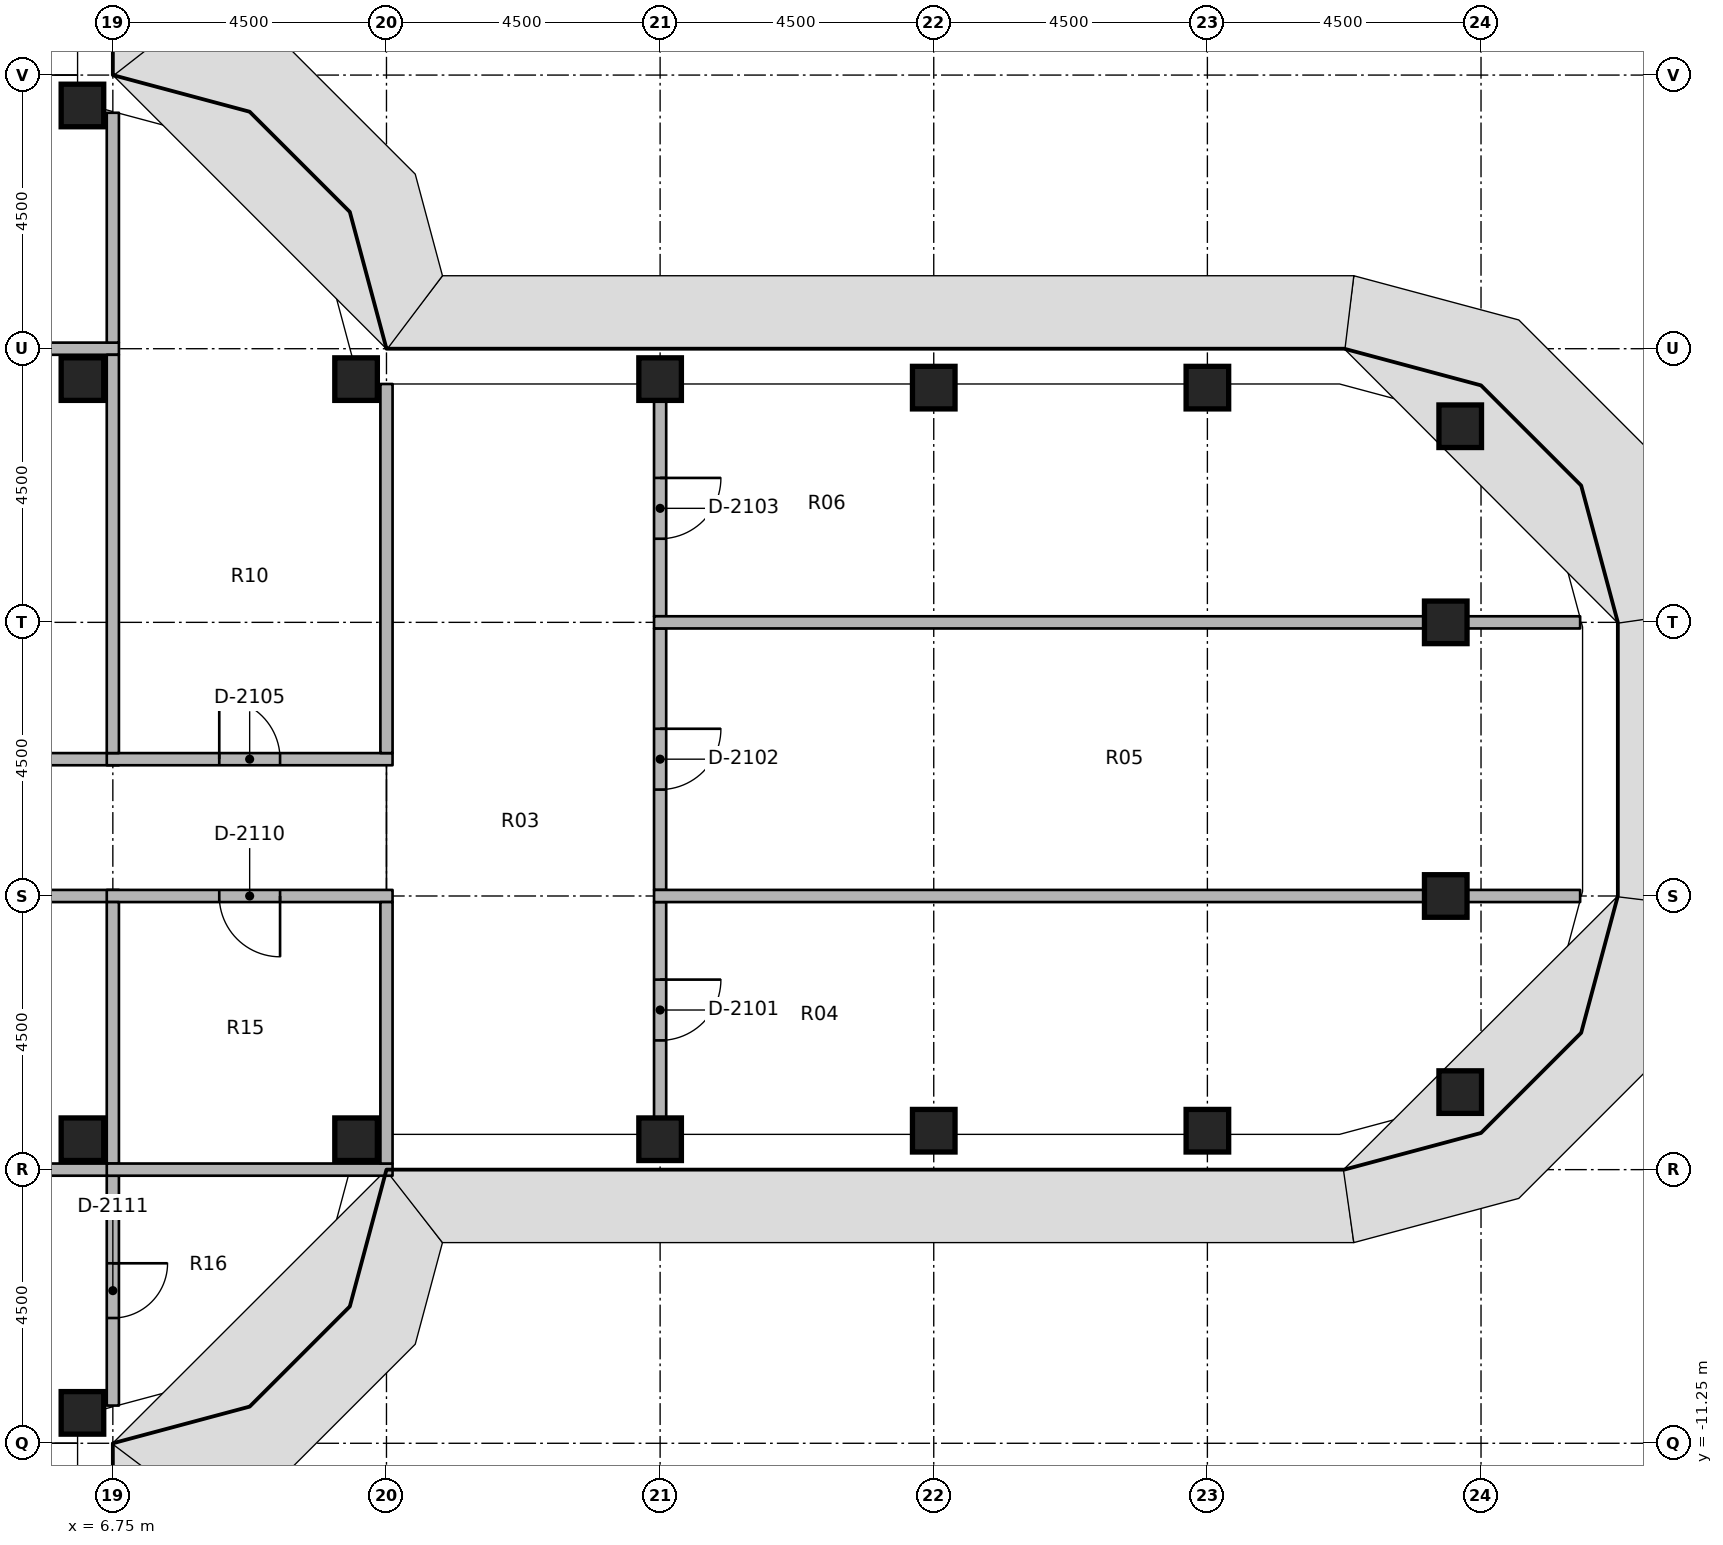
"""IFC4 building model, lengths in metres.
Left out: names, types, materials, properties, quantities, classifications, styles, units other than length and angle.
Written with IfcOpenShell. Run it as: python <this file> out.ifc"""

import sys

from ifc_helpers import new_model, si_unit, direction, frame, frame_2d, origin, origin_2d, place, context, subcontext, project, spatial, rectangle, extrude, element, fill, save


model = new_model("IFC4")
c1 = context("Model", 3, precision=1e-05, world=origin(), true_north=direction((0.0, 1.0)))
c2 = subcontext(c1, "Body", "Model", "MODEL_VIEW")
j1 = project(units=[si_unit("LENGTHUNIT", "METRE"), si_unit("PLANEANGLEUNIT", "RADIAN")], contexts=[c1])
p1 = place(None, origin())
s1 = spatial("IfcSite", under=j1, at=p1, CompositionType="ELEMENT")
p2 = place(p1, origin())
s2 = spatial("IfcBuilding", under=s1, at=p2, CompositionType="ELEMENT")
p3 = place(p2, frame((0.0, 0.0, 195.4)))
s3 = spatial("IfcBuildingStorey", under=s2, at=p3, CompositionType="ELEMENT", Elevation=195.4)
for number, where, z_axis, x_axis in (
    (1, (6.25, -10.75, 0.0), (0.0, 0.0, 1.0), (1.0, 0.0, 0.0)),
    (2, (6.25, -6.25, 0.0), (0.0, 0.0, 1.0), (1.0, 0.0, 0.0)),
    (3, (6.25, 6.25, 0.0), (0.0, 0.0, 1.0), (1.0, 0.0, 0.0)),
    (4, (6.25, 10.75, 0.0), (0.0, 0.0, 1.0), (1.0, 0.0, 0.0)),
    (5, (10.75, -6.25, 0.0), (0.0, 0.0, 1.0), (1.0, 0.0, 0.0)),
    (6, (10.75, 6.25, 0.0), (0.0, 0.0, 1.0), (1.0, 0.0, 0.0)),
    (7, (15.75, -6.25, 0.0), (0.0, 0.0, 1.0), (1.0, 0.0, 0.0)),
    (8, (15.75, 6.25, 0.0), (0.0, 0.0, 1.0), (1.0, 0.0, 0.0)),
    (9, (20.25, -6.11, 0.0), (0.0, 0.0, 1.0), (1.0, 0.0, 0.0)),
    (10, (20.25, 6.11, 0.0), (0.0, 0.0, 1.0), (1.0, 0.0, 0.0)),
    (11, (24.75, -6.11, 0.0), (0.0, 0.0, 1.0), (1.0, 0.0, 0.0)),
    (12, (24.75, 6.11, 0.0), (0.0, 0.0, 1.0), (1.0, 0.0, 0.0)),
    (13, (28.908, -5.475, 0.0), (0.0, 0.0, 1.0), (1.0, 0.0, 0.0)),
    (14, (28.67, -2.25, 0.0), (0.0, 0.0, 1.0), (1.0, 0.0, 0.0)),
    (15, (28.67, 2.25, 0.0), (0.0, 0.0, 1.0), (1.0, 0.0, 0.0)),
    (16, (28.908, 5.475, 0.0), (0.0, 0.0, 1.0), (1.0, 0.0, 0.0)),
):
    element("IfcColumn", number, at=place(p3, frame(where, z_axis=z_axis, x_axis=x_axis)), inside=s3, PredefinedType="COLUMN", context=c2, shape_type="SweptSolid", body=[
        extrude(rectangle(XDim=0.7, YDim=0.7, at=origin_2d()), origin(), (0.0, 0.0, 1.0), 3.65),
    ])
p4 = place(p3, frame((1.025, 0.0, 0.0), z_axis=(0.0, 0.0, 1.0), x_axis=(1.0, 0.0, 0.0)))
e17 = element("IfcWall", 17, at=p4, inside=s3, PredefinedType="PARTITIONING", context=c2, shape_type="SweptSolid", body=[
    extrude(rectangle(XDim=5.825, YDim=0.2, at=frame_2d((2.913, 0.0))), origin(), (0.0, 0.0, 1.0), 2.75),
])
p5 = place(p4, frame((2.413, 0.0, 0.0)))
e18 = element("IfcOpeningElement", 18, at=p5, cuts=e17, PredefinedType="OPENING", context=c2, shape_type="SweptSolid", body=[
    extrude(rectangle(XDim=1.0, YDim=2.1, at=frame_2d((0.5, 1.05))), frame((0.0, 0.11, 0.0), z_axis=(0.0, -1.0, 0.0), x_axis=(1.0, 0.0, 0.0)), (0.0, 0.0, 1.0), 0.22),
])
p6 = place(p3, frame((6.65, 0.0, 0.0), z_axis=(0.0, 0.0, 1.0), x_axis=(1.0, 0.0, 0.0)))
e19 = element("IfcWall", 19, at=p6, inside=s3, PredefinedType="PARTITIONING", context=c2, shape_type="SweptSolid", body=[
    extrude(rectangle(XDim=4.7, YDim=0.2, at=frame_2d((2.35, 0.0))), origin(), (0.0, 0.0, 1.0), 2.75),
])
p7 = place(p6, frame((1.85, 0.0, 0.0)))
e20 = element("IfcOpeningElement", 20, at=p7, cuts=e19, PredefinedType="OPENING", context=c2, shape_type="SweptSolid", body=[
    extrude(rectangle(XDim=1.0, YDim=2.1, at=frame_2d((0.5, 1.05))), frame((0.0, 0.11, 0.0), z_axis=(0.0, -1.0, 0.0), x_axis=(1.0, 0.0, 0.0)), (0.0, 0.0, 1.0), 0.22),
])
p8 = place(p3, frame((6.85, -2.25, 0.0), z_axis=(0.0, 0.0, 1.0), x_axis=(-1.0, 0.0, 0.0)))
e21 = element("IfcWall", 21, at=p8, inside=s3, PredefinedType="PARTITIONING", context=c2, shape_type="SweptSolid", body=[
    extrude(rectangle(XDim=5.825, YDim=0.2, at=frame_2d((2.913, 0.0))), origin(), (0.0, 0.0, 1.0), 2.75),
])
p9 = place(p8, frame((2.413, 0.0, 0.0)))
e22 = element("IfcOpeningElement", 22, at=p9, cuts=e21, PredefinedType="OPENING", context=c2, shape_type="SweptSolid", body=[
    extrude(rectangle(XDim=1.0, YDim=2.1, at=frame_2d((0.5, 1.05))), frame((0.0, 0.11, 0.0), z_axis=(0.0, -1.0, 0.0), x_axis=(1.0, 0.0, 0.0)), (0.0, 0.0, 1.0), 0.22),
])
p10 = place(p3, frame((11.35, -2.25, 0.0), z_axis=(0.0, 0.0, 1.0), x_axis=(-1.0, 0.0, 0.0)))
e23 = element("IfcWall", 23, at=p10, inside=s3, PredefinedType="PARTITIONING", context=c2, shape_type="SweptSolid", body=[
    extrude(rectangle(XDim=4.7, YDim=0.2, at=frame_2d((2.35, 0.0))), origin(), (0.0, 0.0, 1.0), 2.75),
])
p11 = place(p10, frame((1.85, 0.0, 0.0)))
e24 = element("IfcOpeningElement", 24, at=p11, cuts=e23, PredefinedType="OPENING", context=c2, shape_type="SweptSolid", body=[
    extrude(rectangle(XDim=1.0, YDim=2.1, at=frame_2d((0.5, 1.05))), frame((0.0, 0.11, 0.0), z_axis=(0.0, -1.0, 0.0), x_axis=(1.0, 0.0, 0.0)), (0.0, 0.0, 1.0), 0.22),
])
p12 = place(p3, frame((1.025, 6.75, 0.0), z_axis=(0.0, 0.0, 1.0), x_axis=(1.0, 0.0, 0.0)))
e25 = element("IfcWall", 25, at=p12, inside=s3, PredefinedType="PARTITIONING", context=c2, shape_type="SweptSolid", body=[
    extrude(rectangle(XDim=5.825, YDim=0.2, at=frame_2d((2.913, 0.0))), origin(), (0.0, 0.0, 1.0), 2.75),
])
p13 = place(p3, frame((6.75, 6.85, 0.0), z_axis=(0.0, 0.0, 1.0), x_axis=(0.0, 1.0, 0.0)))
e26 = element("IfcWall", 26, at=p13, inside=s3, PredefinedType="PARTITIONING", context=c2, shape_type="SweptSolid", body=[
    extrude(rectangle(XDim=3.78, YDim=0.2, at=frame_2d((1.89, 0.0))), origin(), (0.0, 0.0, 1.0), 2.75),
])
p14 = place(p3, frame((1.025, -6.75, 0.0), z_axis=(0.0, 0.0, 1.0), x_axis=(1.0, 0.0, 0.0)))
e27 = element("IfcWall", 27, at=p14, inside=s3, PredefinedType="PARTITIONING", context=c2, shape_type="SweptSolid", body=[
    extrude(rectangle(XDim=5.825, YDim=0.2, at=frame_2d((2.913, 0.0))), origin(), (0.0, 0.0, 1.0), 2.75),
])
p15 = place(p3, frame((6.75, -6.85, 0.0), z_axis=(0.0, 0.0, 1.0), x_axis=(0.0, -1.0, 0.0)))
e28 = element("IfcWall", 28, at=p15, inside=s3, PredefinedType="PARTITIONING", context=c2, shape_type="SweptSolid", body=[
    extrude(rectangle(XDim=3.78, YDim=0.2, at=frame_2d((1.89, 0.0))), origin(), (0.0, 0.0, 1.0), 2.75),
])
p16 = place(p15, frame((1.44, 0.0, 0.0)))
e29 = element("IfcOpeningElement", 29, at=p16, cuts=e28, PredefinedType="OPENING", context=c2, shape_type="SweptSolid", body=[
    extrude(rectangle(XDim=0.9, YDim=2.1, at=frame_2d((0.45, 1.05))), frame((0.0, 0.11, 0.0), z_axis=(0.0, -1.0, 0.0), x_axis=(1.0, 0.0, 0.0)), (0.0, 0.0, 1.0), 0.22),
])
p17 = place(p3, frame((6.75, 0.1, 0.0), z_axis=(0.0, 0.0, 1.0), x_axis=(0.0, 1.0, 0.0)))
e30 = element("IfcWall", 30, at=p17, inside=s3, PredefinedType="PARTITIONING", context=c2, shape_type="SweptSolid", body=[
    extrude(rectangle(XDim=6.55, YDim=0.2, at=frame_2d((3.275, 0.0))), origin(), (0.0, 0.0, 1.0), 2.75),
])
p18 = place(p3, frame((11.25, 0.1, 0.0), z_axis=(0.0, 0.0, 1.0), x_axis=(0.0, 1.0, 0.0)))
e31 = element("IfcWall", 31, at=p18, inside=s3, PredefinedType="PARTITIONING", context=c2, shape_type="SweptSolid", body=[
    extrude(rectangle(XDim=6.07, YDim=0.2, at=frame_2d((3.035, 0.0))), origin(), (0.0, 0.0, 1.0), 2.75),
])
p19 = place(p3, frame((6.75, -6.65, 0.0), z_axis=(0.0, 0.0, 1.0), x_axis=(0.0, 1.0, 0.0)))
e32 = element("IfcWall", 32, at=p19, inside=s3, PredefinedType="PARTITIONING", context=c2, shape_type="SweptSolid", body=[
    extrude(rectangle(XDim=4.3, YDim=0.2, at=frame_2d((2.15, 0.0))), origin(), (0.0, 0.0, 1.0), 2.75),
])
p20 = place(p3, frame((6.65, -6.75, 0.0), z_axis=(0.0, 0.0, 1.0), x_axis=(1.0, 0.0, 0.0)))
e33 = element("IfcWall", 33, at=p20, inside=s3, PredefinedType="PARTITIONING", context=c2, shape_type="SweptSolid", body=[
    extrude(rectangle(XDim=4.7, YDim=0.2, at=frame_2d((2.35, 0.0))), origin(), (0.0, 0.0, 1.0), 2.75),
])
p21 = place(p3, frame((11.25, -6.65, 0.0), z_axis=(0.0, 0.0, 1.0), x_axis=(0.0, 1.0, 0.0)))
e34 = element("IfcWall", 34, at=p21, inside=s3, PredefinedType="PARTITIONING", context=c2, shape_type="SweptSolid", body=[
    extrude(rectangle(XDim=4.3, YDim=0.2, at=frame_2d((2.15, 0.0))), origin(), (0.0, 0.0, 1.0), 2.75),
])
p22 = place(p3, frame((15.75, -2.35, 0.0), z_axis=(0.0, 0.0, 1.0), x_axis=(0.0, -1.0, 0.0)))
e35 = element("IfcWall", 35, at=p22, inside=s3, PredefinedType="PARTITIONING", context=c2, shape_type="SweptSolid", body=[
    extrude(rectangle(XDim=3.55, YDim=0.2, at=frame_2d((1.775, 0.0))), origin(), (0.0, 0.0, 1.0), 2.75),
])
p23 = place(p22, frame((1.275, 0.0, 0.0)))
e36 = element("IfcOpeningElement", 36, at=p23, cuts=e35, PredefinedType="OPENING", context=c2, shape_type="SweptSolid", body=[
    extrude(rectangle(XDim=1.0, YDim=2.1, at=frame_2d((0.5, 1.05))), frame((0.0, 0.11, 0.0), z_axis=(0.0, -1.0, 0.0), x_axis=(1.0, 0.0, 0.0)), (0.0, 0.0, 1.0), 0.22),
])
p24 = place(p3, frame((15.75, 2.15, 0.0), z_axis=(0.0, 0.0, 1.0), x_axis=(0.0, -1.0, 0.0)))
e37 = element("IfcWall", 37, at=p24, inside=s3, PredefinedType="PARTITIONING", context=c2, shape_type="SweptSolid", body=[
    extrude(rectangle(XDim=4.3, YDim=0.2, at=frame_2d((2.15, 0.0))), origin(), (0.0, 0.0, 1.0), 2.75),
])
p25 = place(p24, frame((1.65, 0.0, 0.0)))
e38 = element("IfcOpeningElement", 38, at=p25, cuts=e37, PredefinedType="OPENING", context=c2, shape_type="SweptSolid", body=[
    extrude(rectangle(XDim=1.0, YDim=2.1, at=frame_2d((0.5, 1.05))), frame((0.0, 0.11, 0.0), z_axis=(0.0, -1.0, 0.0), x_axis=(1.0, 0.0, 0.0)), (0.0, 0.0, 1.0), 0.22),
])
p26 = place(p3, frame((15.75, 5.9, 0.0), z_axis=(0.0, 0.0, 1.0), x_axis=(0.0, -1.0, 0.0)))
e39 = element("IfcWall", 39, at=p26, inside=s3, PredefinedType="PARTITIONING", context=c2, shape_type="SweptSolid", body=[
    extrude(rectangle(XDim=3.55, YDim=0.2, at=frame_2d((1.775, 0.0))), origin(), (0.0, 0.0, 1.0), 2.75),
])
p27 = place(p26, frame((1.275, 0.0, 0.0)))
e40 = element("IfcOpeningElement", 40, at=p27, cuts=e39, PredefinedType="OPENING", context=c2, shape_type="SweptSolid", body=[
    extrude(rectangle(XDim=1.0, YDim=2.1, at=frame_2d((0.5, 1.05))), frame((0.0, 0.11, 0.0), z_axis=(0.0, -1.0, 0.0), x_axis=(1.0, 0.0, 0.0)), (0.0, 0.0, 1.0), 0.22),
])
p28 = place(p3, frame((15.65, -2.25, 0.0), z_axis=(0.0, 0.0, 1.0), x_axis=(1.0, 0.0, 0.0)))
e41 = element("IfcWall", 41, at=p28, inside=s3, PredefinedType="PARTITIONING", context=c2, shape_type="SweptSolid", body=[
    extrude(rectangle(XDim=12.67, YDim=0.2, at=frame_2d((6.335, 0.0))), origin(), (0.0, 0.0, 1.0), 2.75),
])
p29 = place(p3, frame((29.02, -2.25, 0.0), z_axis=(0.0, 0.0, 1.0), x_axis=(1.0, 0.0, 0.0)))
e42 = element("IfcWall", 42, at=p29, inside=s3, PredefinedType="PARTITIONING", context=c2, shape_type="SweptSolid", body=[
    extrude(rectangle(XDim=1.86, YDim=0.2, at=frame_2d((0.93, 0.0))), origin(), (0.0, 0.0, 1.0), 2.75),
])
p30 = place(p3, frame((15.65, 2.25, 0.0), z_axis=(0.0, 0.0, 1.0), x_axis=(1.0, 0.0, 0.0)))
e43 = element("IfcWall", 43, at=p30, inside=s3, PredefinedType="PARTITIONING", context=c2, shape_type="SweptSolid", body=[
    extrude(rectangle(XDim=12.67, YDim=0.2, at=frame_2d((6.335, 0.0))), origin(), (0.0, 0.0, 1.0), 2.75),
])
p31 = place(p3, frame((29.02, 2.25, 0.0), z_axis=(0.0, 0.0, 1.0), x_axis=(1.0, 0.0, 0.0)))
e44 = element("IfcWall", 44, at=p31, inside=s3, PredefinedType="PARTITIONING", context=c2, shape_type="SweptSolid", body=[
    extrude(rectangle(XDim=1.86, YDim=0.2, at=frame_2d((0.93, 0.0))), origin(), (0.0, 0.0, 1.0), 2.75),
])
p32 = place(p23, origin())
e45 = element("IfcDoor", 45, at=p32, inside=s3, OperationType="SINGLE_SWING_LEFT", PredefinedType="DOOR", context=c2, shape_type="SweptSolid", body=[
    extrude(rectangle(XDim=1.0, YDim=2.1, at=frame_2d((0.5, 1.05))), frame((0.0, 0.025, 0.0), z_axis=(0.0, -1.0, 0.0), x_axis=(1.0, 0.0, 0.0)), (0.0, 0.0, 1.0), 0.05),
])
fill(e36, e45)
p33 = place(p25, origin())
e46 = element("IfcDoor", 46, at=p33, inside=s3, OperationType="SINGLE_SWING_RIGHT", PredefinedType="DOOR", context=c2, shape_type="SweptSolid", body=[
    extrude(rectangle(XDim=1.0, YDim=2.1, at=frame_2d((0.5, 1.05))), frame((0.0, 0.025, 0.0), z_axis=(0.0, -1.0, 0.0), x_axis=(1.0, 0.0, 0.0)), (0.0, 0.0, 1.0), 0.05),
])
fill(e38, e46)
p34 = place(p27, origin())
e47 = element("IfcDoor", 47, at=p34, inside=s3, OperationType="SINGLE_SWING_RIGHT", PredefinedType="DOOR", context=c2, shape_type="SweptSolid", body=[
    extrude(rectangle(XDim=1.0, YDim=2.1, at=frame_2d((0.5, 1.05))), frame((0.0, 0.025, 0.0), z_axis=(0.0, -1.0, 0.0), x_axis=(1.0, 0.0, 0.0)), (0.0, 0.0, 1.0), 0.05),
])
fill(e40, e47)
p35 = place(p7, origin())
e48 = element("IfcDoor", 48, at=p35, inside=s3, OperationType="SINGLE_SWING_RIGHT", PredefinedType="DOOR", context=c2, shape_type="SweptSolid", body=[
    extrude(rectangle(XDim=1.0, YDim=2.1, at=frame_2d((0.5, 1.05))), frame((0.0, 0.025, 0.0), z_axis=(0.0, -1.0, 0.0), x_axis=(1.0, 0.0, 0.0)), (0.0, 0.0, 1.0), 0.05),
])
fill(e20, e48)
p36 = place(p11, origin())
e49 = element("IfcDoor", 49, at=p36, inside=s3, OperationType="SINGLE_SWING_RIGHT", PredefinedType="DOOR", context=c2, shape_type="SweptSolid", body=[
    extrude(rectangle(XDim=1.0, YDim=2.1, at=frame_2d((0.5, 1.05))), frame((0.0, 0.025, 0.0), z_axis=(0.0, -1.0, 0.0), x_axis=(1.0, 0.0, 0.0)), (0.0, 0.0, 1.0), 0.05),
])
fill(e24, e49)
p37 = place(p16, origin())
e50 = element("IfcDoor", 50, at=p37, inside=s3, OperationType="SINGLE_SWING_LEFT", PredefinedType="DOOR", context=c2, shape_type="SweptSolid", body=[
    extrude(rectangle(XDim=0.9, YDim=2.1, at=frame_2d((0.45, 1.05))), frame((0.0, 0.025, 0.0), z_axis=(0.0, -1.0, 0.0), x_axis=(1.0, 0.0, 0.0)), (0.0, 0.0, 1.0), 0.05),
])
fill(e29, e50)
save(model, sys.argv[1])
